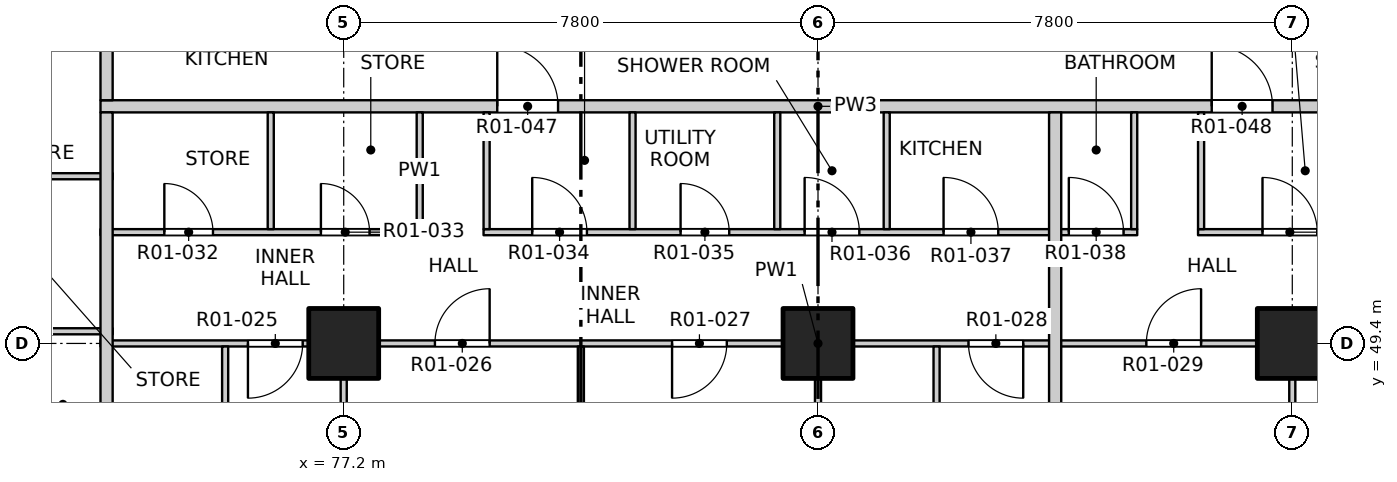
"""IFC4 building model, lengths in metres.
Left out: names, types, materials, properties, quantities, classifications, styles, units other than length and angle.
Written with IfcOpenShell. Run it as: python <this file> out.ifc"""

import sys

from ifc_helpers import new_model, si_unit, direction, frame, frame_2d, origin, origin_2d, place, context, subcontext, project, spatial, rectangle, extrude, element, fill, save


model = new_model("IFC4")
c1 = context("Model", 3, precision=1e-05, world=origin(), true_north=direction((0.0, 1.0)))
c2 = subcontext(c1, "Body", "Model", "MODEL_VIEW")
j1 = project(units=[si_unit("LENGTHUNIT", "METRE"), si_unit("PLANEANGLEUNIT", "RADIAN")], contexts=[c1])
p1 = place(None, origin())
s1 = spatial("IfcSite", under=j1, at=p1, CompositionType="ELEMENT")
p2 = place(p1, origin())
s2 = spatial("IfcBuilding", under=s1, at=p2, CompositionType="ELEMENT")
p3 = place(p2, frame((0.0, 0.0, 19.5)))
s3 = spatial("IfcBuildingStorey", under=s2, at=p3, CompositionType="ELEMENT", Elevation=19.5)
for number, where, z_axis, x_axis in (
    (1, (77.2, 49.4, -0.25), (0.0, 0.0, 1.0), (1.0, 0.0, 0.0)),
    (2, (85.0, 49.4, -0.25), (0.0, 0.0, 1.0), (1.0, 0.0, 0.0)),
    (3, (92.8, 49.4, -0.25), (0.0, 0.0, 1.0), (1.0, 0.0, 0.0)),
):
    element("IfcColumn", number, at=place(p3, frame(where, z_axis=z_axis, x_axis=x_axis)), inside=s3, PredefinedType="COLUMN", context=c2, shape_type="SweptSolid", body=[
        extrude(rectangle(XDim=1.15, YDim=1.15, at=origin_2d()), origin(), (0.0, 0.0, 1.0), 3.4),
    ])
p4 = place(p3, frame((73.2, 49.4, 0.0), z_axis=(0.0, 0.0, 1.0), x_axis=(1.0, 0.0, 0.0)))
e4 = element("IfcWall", 4, at=p4, inside=s3, PredefinedType="PARTITIONING", context=c2, shape_type="SweptSolid", body=[
    extrude(rectangle(XDim=23.6, YDim=0.1, at=frame_2d((11.8, 0.0))), origin(), (0.0, 0.0, 1.0), 3.15),
])
p5 = place(p4, frame((2.425, 0.0, 0.0)))
e5 = element("IfcOpeningElement", 5, at=p5, cuts=e4, PredefinedType="OPENING", context=c2, shape_type="SweptSolid", body=[
    extrude(rectangle(XDim=0.9, YDim=2.1, at=frame_2d((0.45, 1.05))), frame((0.0, 0.06, 0.0), z_axis=(0.0, -1.0, 0.0), x_axis=(1.0, 0.0, 0.0)), (0.0, 0.0, 1.0), 0.12),
])
p6 = place(p4, frame((5.5, 0.0, 0.0)))
e6 = element("IfcOpeningElement", 6, at=p6, cuts=e4, PredefinedType="OPENING", context=c2, shape_type="SweptSolid", body=[
    extrude(rectangle(XDim=0.9, YDim=2.1, at=frame_2d((0.45, 1.05))), frame((0.0, 0.06, 0.0), z_axis=(0.0, -1.0, 0.0), x_axis=(1.0, 0.0, 0.0)), (0.0, 0.0, 1.0), 0.12),
])
p7 = place(p4, frame((9.4, 0.0, 0.0)))
e7 = element("IfcOpeningElement", 7, at=p7, cuts=e4, PredefinedType="OPENING", context=c2, shape_type="SweptSolid", body=[
    extrude(rectangle(XDim=0.9, YDim=2.1, at=frame_2d((0.45, 1.05))), frame((0.0, 0.06, 0.0), z_axis=(0.0, -1.0, 0.0), x_axis=(1.0, 0.0, 0.0)), (0.0, 0.0, 1.0), 0.12),
])
p8 = place(p4, frame((14.275, 0.0, 0.0)))
e8 = element("IfcOpeningElement", 8, at=p8, cuts=e4, PredefinedType="OPENING", context=c2, shape_type="SweptSolid", body=[
    extrude(rectangle(XDim=0.9, YDim=2.1, at=frame_2d((0.45, 1.05))), frame((0.0, 0.06, 0.0), z_axis=(0.0, -1.0, 0.0), x_axis=(1.0, 0.0, 0.0)), (0.0, 0.0, 1.0), 0.12),
])
p9 = place(p4, frame((17.2, 0.0, 0.0)))
e9 = element("IfcOpeningElement", 9, at=p9, cuts=e4, PredefinedType="OPENING", context=c2, shape_type="SweptSolid", body=[
    extrude(rectangle(XDim=0.9, YDim=2.1, at=frame_2d((0.45, 1.05))), frame((0.0, 0.06, 0.0), z_axis=(0.0, -1.0, 0.0), x_axis=(1.0, 0.0, 0.0)), (0.0, 0.0, 1.0), 0.12),
])
p10 = place(p4, frame((22.075, 0.0, 0.0)))
e10 = element("IfcOpeningElement", 10, at=p10, cuts=e4, PredefinedType="OPENING", context=c2, shape_type="SweptSolid", body=[
    extrude(rectangle(XDim=0.9, YDim=2.1, at=frame_2d((0.45, 1.05))), frame((0.0, 0.06, 0.0), z_axis=(0.0, -1.0, 0.0), x_axis=(1.0, 0.0, 0.0)), (0.0, 0.0, 1.0), 0.12),
])
p11 = place(p3, frame((71.18, 49.6, 0.0), z_axis=(0.0, 0.0, 1.0), x_axis=(1.0, 0.0, 0.0)))
e11 = element("IfcWall", 11, at=p11, inside=s3, PredefinedType="PARTITIONING", context=c2, shape_type="SweptSolid", body=[
    extrude(rectangle(XDim=2.22, YDim=0.1, at=frame_2d((1.11, 0.0))), origin(), (0.0, 0.0, 1.0), 3.15),
])
p12 = place(p3, frame((73.2, 51.23, 0.0), z_axis=(0.0, 0.0, 1.0), x_axis=(1.0, 0.0, 0.0)))
e12 = element("IfcWall", 12, at=p12, inside=s3, PredefinedType="PARTITIONING", context=c2, shape_type="SweptSolid", body=[
    extrude(rectangle(XDim=5.3, YDim=0.1, at=frame_2d((2.65, 0.0))), origin(), (0.0, 0.0, 1.0), 3.15),
])
p13 = place(p12, frame((1.05, 0.0, 0.0)))
e13 = element("IfcOpeningElement", 13, at=p13, cuts=e12, PredefinedType="OPENING", context=c2, shape_type="SweptSolid", body=[
    extrude(rectangle(XDim=0.8, YDim=2.1, at=frame_2d((0.4, 1.05))), frame((0.0, 0.06, 0.0), z_axis=(0.0, -1.0, 0.0), x_axis=(1.0, 0.0, 0.0)), (0.0, 0.0, 1.0), 0.12),
])
p14 = place(p12, frame((3.625, 0.0, 0.0)))
e14 = element("IfcOpeningElement", 14, at=p14, cuts=e12, PredefinedType="OPENING", context=c2, shape_type="SweptSolid", body=[
    extrude(rectangle(XDim=0.8, YDim=2.1, at=frame_2d((0.4, 1.05))), frame((0.0, 0.06, 0.0), z_axis=(0.0, -1.0, 0.0), x_axis=(1.0, 0.0, 0.0)), (0.0, 0.0, 1.0), 0.12),
])
p15 = place(p3, frame((79.5, 51.23, 0.0), z_axis=(0.0, 0.0, 1.0), x_axis=(1.0, 0.0, 0.0)))
e15 = element("IfcWall", 15, at=p15, inside=s3, PredefinedType="PARTITIONING", context=c2, shape_type="SweptSolid", body=[
    extrude(rectangle(XDim=10.75, YDim=0.1, at=frame_2d((5.375, 0.0))), origin(), (0.0, 0.0, 1.0), 3.15),
])
p16 = place(p15, frame((0.8, 0.0, 0.0)))
e16 = element("IfcOpeningElement", 16, at=p16, cuts=e15, PredefinedType="OPENING", context=c2, shape_type="SweptSolid", body=[
    extrude(rectangle(XDim=0.9, YDim=2.1, at=frame_2d((0.45, 1.05))), frame((0.0, 0.06, 0.0), z_axis=(0.0, -1.0, 0.0), x_axis=(1.0, 0.0, 0.0)), (0.0, 0.0, 1.0), 0.12),
])
p17 = place(p15, frame((3.24, 0.0, 0.0)))
e17 = element("IfcOpeningElement", 17, at=p17, cuts=e15, PredefinedType="OPENING", context=c2, shape_type="SweptSolid", body=[
    extrude(rectangle(XDim=0.8, YDim=2.1, at=frame_2d((0.4, 1.05))), frame((0.0, 0.06, 0.0), z_axis=(0.0, -1.0, 0.0), x_axis=(1.0, 0.0, 0.0)), (0.0, 0.0, 1.0), 0.12),
])
p18 = place(p15, frame((5.28, 0.0, 0.0)))
e18 = element("IfcOpeningElement", 18, at=p18, cuts=e15, PredefinedType="OPENING", context=c2, shape_type="SweptSolid", body=[
    extrude(rectangle(XDim=0.9, YDim=2.1, at=frame_2d((0.45, 1.05))), frame((0.0, 0.06, 0.0), z_axis=(0.0, -1.0, 0.0), x_axis=(1.0, 0.0, 0.0)), (0.0, 0.0, 1.0), 0.12),
])
p19 = place(p15, frame((7.565, 0.0, 0.0)))
e19 = element("IfcOpeningElement", 19, at=p19, cuts=e15, PredefinedType="OPENING", context=c2, shape_type="SweptSolid", body=[
    extrude(rectangle(XDim=0.9, YDim=2.1, at=frame_2d((0.45, 1.05))), frame((0.0, 0.06, 0.0), z_axis=(0.0, -1.0, 0.0), x_axis=(1.0, 0.0, 0.0)), (0.0, 0.0, 1.0), 0.12),
])
p20 = place(p15, frame((9.625, 0.0, 0.0)))
e20 = element("IfcOpeningElement", 20, at=p20, cuts=e15, PredefinedType="OPENING", context=c2, shape_type="SweptSolid", body=[
    extrude(rectangle(XDim=0.9, YDim=2.1, at=frame_2d((0.45, 1.05))), frame((0.0, 0.06, 0.0), z_axis=(0.0, -1.0, 0.0), x_axis=(1.0, 0.0, 0.0)), (0.0, 0.0, 1.0), 0.12),
])
p21 = place(p3, frame((91.25, 51.23, 0.0), z_axis=(0.0, 0.0, 1.0), x_axis=(1.0, 0.0, 0.0)))
e21 = element("IfcWall", 21, at=p21, inside=s3, PredefinedType="PARTITIONING", context=c2, shape_type="SweptSolid", body=[
    extrude(rectangle(XDim=5.55, YDim=0.1, at=frame_2d((2.775, 0.0))), origin(), (0.0, 0.0, 1.0), 3.15),
])
p22 = place(p21, frame((1.06, 0.0, 0.0)))
e22 = element("IfcOpeningElement", 22, at=p22, cuts=e21, PredefinedType="OPENING", context=c2, shape_type="SweptSolid", body=[
    extrude(rectangle(XDim=0.9, YDim=2.1, at=frame_2d((0.45, 1.05))), frame((0.0, 0.06, 0.0), z_axis=(0.0, -1.0, 0.0), x_axis=(1.0, 0.0, 0.0)), (0.0, 0.0, 1.0), 0.12),
])
p23 = place(p21, frame((3.81, 0.0, 0.0)))
e23 = element("IfcOpeningElement", 23, at=p23, cuts=e21, PredefinedType="OPENING", context=c2, shape_type="SweptSolid", body=[
    extrude(rectangle(XDim=0.8, YDim=2.1, at=frame_2d((0.4, 1.05))), frame((0.0, 0.06, 0.0), z_axis=(0.0, -1.0, 0.0), x_axis=(1.0, 0.0, 0.0)), (0.0, 0.0, 1.0), 0.12),
])
p24 = place(p3, frame((71.18, 52.15, 0.0), z_axis=(0.0, 0.0, 1.0), x_axis=(1.0, 0.0, 0.0)))
e24 = element("IfcWall", 24, at=p24, inside=s3, PredefinedType="PARTITIONING", context=c2, shape_type="SweptSolid", body=[
    extrude(rectangle(XDim=2.22, YDim=0.1, at=frame_2d((1.11, 0.0))), origin(), (0.0, 0.0, 1.0), 3.15),
])
p25 = place(p3, frame((73.2, 53.3, 0.0), z_axis=(0.0, 0.0, 1.0), x_axis=(1.0, 0.0, 0.0)))
e25 = element("IfcWall", 25, at=p25, inside=s3, PredefinedType="PARTITIONING", context=c2, shape_type="SweptSolid", body=[
    extrude(rectangle(XDim=23.6, YDim=0.2, at=frame_2d((11.8, 0.0))), origin(), (0.0, 0.0, 1.0), 3.15),
])
p26 = place(p25, frame((6.525, 0.0, 0.0)))
e26 = element("IfcOpeningElement", 26, at=p26, cuts=e25, PredefinedType="OPENING", context=c2, shape_type="SweptSolid", body=[
    extrude(rectangle(XDim=1.0, YDim=2.1, at=frame_2d((0.5, 1.05))), frame((0.0, 0.11, 0.0), z_axis=(0.0, -1.0, 0.0), x_axis=(1.0, 0.0, 0.0)), (0.0, 0.0, 1.0), 0.22),
])
p27 = place(p25, frame((18.275, 0.0, 0.0)))
e27 = element("IfcOpeningElement", 27, at=p27, cuts=e25, PredefinedType="OPENING", context=c2, shape_type="SweptSolid", body=[
    extrude(rectangle(XDim=1.0, YDim=2.1, at=frame_2d((0.5, 1.05))), frame((0.0, 0.11, 0.0), z_axis=(0.0, -1.0, 0.0), x_axis=(1.0, 0.0, 0.0)), (0.0, 0.0, 1.0), 0.22),
])
p28 = place(p3, frame((73.3, 41.9, 0.0), z_axis=(0.0, 0.0, 1.0), x_axis=(0.0, 1.0, 0.0)))
e28 = element("IfcWall", 28, at=p28, inside=s3, PredefinedType="PARTITIONING", context=c2, shape_type="SweptSolid", body=[
    extrude(rectangle(XDim=11.3, YDim=0.2, at=frame_2d((5.65, 0.0))), origin(), (0.0, 0.0, 1.0), 3.15),
])
p29 = place(p3, frame((73.3, 53.4, 0.0), z_axis=(0.0, 0.0, 1.0), x_axis=(0.0, 1.0, 0.0)))
e29 = element("IfcWall", 29, at=p29, inside=s3, PredefinedType="PARTITIONING", context=c2, shape_type="SweptSolid", body=[
    extrude(rectangle(XDim=31.0, YDim=0.2, at=frame_2d((15.5, 0.0))), origin(), (0.0, 0.0, 1.0), 3.15),
])
p30 = place(p29, frame((2.325, 0.0, 0.0)))
e30 = element("IfcOpeningElement", 30, at=p30, cuts=e29, PredefinedType="OPENING", context=c2, shape_type="SweptSolid", body=[
    extrude(rectangle(XDim=1.0, YDim=2.1, at=frame_2d((0.5, 1.05))), frame((0.0, 0.11, 0.0), z_axis=(0.0, -1.0, 0.0), x_axis=(1.0, 0.0, 0.0)), (0.0, 0.0, 1.0), 0.22),
])
p31 = place(p29, frame((10.725, 0.0, 0.0)))
e31 = element("IfcOpeningElement", 31, at=p31, cuts=e29, PredefinedType="OPENING", context=c2, shape_type="SweptSolid", body=[
    extrude(rectangle(XDim=1.0, YDim=2.1, at=frame_2d((0.5, 1.05))), frame((0.0, 0.11, 0.0), z_axis=(0.0, -1.0, 0.0), x_axis=(1.0, 0.0, 0.0)), (0.0, 0.0, 1.0), 0.22),
])
p32 = place(p29, frame((18.225, 0.0, 0.0)))
e32 = element("IfcOpeningElement", 32, at=p32, cuts=e29, PredefinedType="OPENING", context=c2, shape_type="SweptSolid", body=[
    extrude(rectangle(XDim=1.0, YDim=2.1, at=frame_2d((0.5, 1.05))), frame((0.0, 0.11, 0.0), z_axis=(0.0, -1.0, 0.0), x_axis=(1.0, 0.0, 0.0)), (0.0, 0.0, 1.0), 0.22),
])
p33 = place(p29, frame((25.925, 0.0, 0.0)))
e33 = element("IfcOpeningElement", 33, at=p33, cuts=e29, PredefinedType="OPENING", context=c2, shape_type="SweptSolid", body=[
    extrude(rectangle(XDim=1.0, YDim=2.1, at=frame_2d((0.5, 1.05))), frame((0.0, 0.11, 0.0), z_axis=(0.0, -1.0, 0.0), x_axis=(1.0, 0.0, 0.0)), (0.0, 0.0, 1.0), 0.22),
])
p34 = place(p3, frame((75.25, 46.0, 0.0), z_axis=(0.0, 0.0, 1.0), x_axis=(0.0, 1.0, 0.0)))
e34 = element("IfcWall", 34, at=p34, inside=s3, PredefinedType="PARTITIONING", context=c2, shape_type="SweptSolid", body=[
    extrude(rectangle(XDim=3.35, YDim=0.1, at=frame_2d((1.675, 0.0))), origin(), (0.0, 0.0, 1.0), 3.15),
])
p35 = place(p3, frame((76.0, 51.28, 0.0), z_axis=(0.0, 0.0, 1.0), x_axis=(0.0, 1.0, 0.0)))
e35 = element("IfcWall", 35, at=p35, inside=s3, PredefinedType="PARTITIONING", context=c2, shape_type="SweptSolid", body=[
    extrude(rectangle(XDim=1.92, YDim=0.1, at=frame_2d((0.96, 0.0))), origin(), (0.0, 0.0, 1.0), 3.15),
])
p36 = place(p3, frame((77.2, 41.9, 0.0), z_axis=(0.0, 0.0, 1.0), x_axis=(0.0, 1.0, 0.0)))
e36 = element("IfcWall", 36, at=p36, inside=s3, PredefinedType="PARTITIONING", context=c2, shape_type="SweptSolid", body=[
    extrude(rectangle(XDim=7.45, YDim=0.1, at=frame_2d((3.725, 0.0))), origin(), (0.0, 0.0, 1.0), 2.55),
])
for number, where, z_axis, x_axis in (
    (37, (78.45, 51.28, 0.0), (0.0, 0.0, 1.0), (0.0, 1.0, 0.0)),
    (38, (79.55, 51.28, 0.0), (0.0, 0.0, 1.0), (0.0, 1.0, 0.0)),
):
    element("IfcWall", number, at=place(p3, frame(where, z_axis=z_axis, x_axis=x_axis)), inside=s3, PredefinedType="PARTITIONING", context=c2, shape_type="SweptSolid", body=[
        extrude(rectangle(XDim=1.92, YDim=0.1, at=frame_2d((0.96, 0.0))), origin(), (0.0, 0.0, 1.0), 3.15),
    ])
p37 = place(p3, frame((81.1, 41.9, 0.0), z_axis=(0.0, 0.0, 1.0), x_axis=(0.0, 1.0, 0.0)))
e39 = element("IfcWall", 39, at=p37, inside=s3, PredefinedType="PARTITIONING", context=c2, shape_type="SweptSolid", body=[
    extrude(rectangle(XDim=7.45, YDim=0.1, at=frame_2d((3.725, 0.0))), origin(), (0.0, 0.0, 1.0), 3.15),
])
for number, where, z_axis, x_axis in (
    (40, (81.95, 51.28, 0.0), (0.0, 0.0, 1.0), (0.0, 1.0, 0.0)),
    (41, (84.33, 51.28, 0.0), (0.0, 0.0, 1.0), (0.0, 1.0, 0.0)),
):
    element("IfcWall", number, at=place(p3, frame(where, z_axis=z_axis, x_axis=x_axis)), inside=s3, PredefinedType="PARTITIONING", context=c2, shape_type="SweptSolid", body=[
        extrude(rectangle(XDim=1.92, YDim=0.1, at=frame_2d((0.96, 0.0))), origin(), (0.0, 0.0, 1.0), 3.15),
    ])
p38 = place(p3, frame((85.0, 41.9, 0.0), z_axis=(0.0, 0.0, 1.0), x_axis=(0.0, 1.0, 0.0)))
e42 = element("IfcWall", 42, at=p38, inside=s3, PredefinedType="PARTITIONING", context=c2, shape_type="SweptSolid", body=[
    extrude(rectangle(XDim=7.45, YDim=0.1, at=frame_2d((3.725, 0.0))), origin(), (0.0, 0.0, 1.0), 2.55),
])
p39 = place(p3, frame((86.13, 51.28, 0.0), z_axis=(0.0, 0.0, 1.0), x_axis=(0.0, 1.0, 0.0)))
e43 = element("IfcWall", 43, at=p39, inside=s3, PredefinedType="PARTITIONING", context=c2, shape_type="SweptSolid", body=[
    extrude(rectangle(XDim=1.92, YDim=0.1, at=frame_2d((0.96, 0.0))), origin(), (0.0, 0.0, 1.0), 3.15),
])
p40 = place(p3, frame((86.95, 46.0, 0.0), z_axis=(0.0, 0.0, 1.0), x_axis=(0.0, 1.0, 0.0)))
e44 = element("IfcWall", 44, at=p40, inside=s3, PredefinedType="PARTITIONING", context=c2, shape_type="SweptSolid", body=[
    extrude(rectangle(XDim=3.35, YDim=0.1, at=frame_2d((1.675, 0.0))), origin(), (0.0, 0.0, 1.0), 3.15),
])
p41 = place(p3, frame((88.9, 41.9, 0.0), z_axis=(0.0, 0.0, 1.0), x_axis=(0.0, 1.0, 0.0)))
e45 = element("IfcWall", 45, at=p41, inside=s3, PredefinedType="PARTITIONING", context=c2, shape_type="SweptSolid", body=[
    extrude(rectangle(XDim=11.3, YDim=0.2, at=frame_2d((5.65, 0.0))), origin(), (0.0, 0.0, 1.0), 3.15),
])
for number, where, z_axis, x_axis in (
    (46, (90.2, 51.28, 0.0), (0.0, 0.0, 1.0), (0.0, 1.0, 0.0)),
    (47, (91.3, 51.28, 0.0), (0.0, 0.0, 1.0), (0.0, 1.0, 0.0)),
):
    element("IfcWall", number, at=place(p3, frame(where, z_axis=z_axis, x_axis=x_axis)), inside=s3, PredefinedType="PARTITIONING", context=c2, shape_type="SweptSolid", body=[
        extrude(rectangle(XDim=1.92, YDim=0.1, at=frame_2d((0.96, 0.0))), origin(), (0.0, 0.0, 1.0), 3.15),
    ])
p42 = place(p3, frame((92.8, 41.9, 0.0), z_axis=(0.0, 0.0, 1.0), x_axis=(0.0, 1.0, 0.0)))
e48 = element("IfcWall", 48, at=p42, inside=s3, PredefinedType="PARTITIONING", context=c2, shape_type="SweptSolid", body=[
    extrude(rectangle(XDim=7.45, YDim=0.1, at=frame_2d((3.725, 0.0))), origin(), (0.0, 0.0, 1.0), 2.55),
])
p43 = place(p5, origin())
e49 = element("IfcDoor", 49, at=p43, inside=s3, OperationType="SINGLE_SWING_RIGHT", PredefinedType="DOOR", context=c2, shape_type="SweptSolid", body=[
    extrude(rectangle(XDim=0.9, YDim=2.1, at=frame_2d((0.45, 1.05))), frame((0.0, 0.025, 0.0), z_axis=(0.0, -1.0, 0.0), x_axis=(1.0, 0.0, 0.0)), (0.0, 0.0, 1.0), 0.05),
])
fill(e5, e49)
p44 = place(p6, origin())
e50 = element("IfcDoor", 50, at=p44, inside=s3, OperationType="SINGLE_SWING_RIGHT", PredefinedType="DOOR", context=c2, shape_type="SweptSolid", body=[
    extrude(rectangle(XDim=0.9, YDim=2.1, at=frame_2d((0.45, 1.05))), frame((0.0, 0.025, 0.0), z_axis=(0.0, -1.0, 0.0), x_axis=(1.0, 0.0, 0.0)), (0.0, 0.0, 1.0), 0.05),
])
fill(e6, e50)
p45 = place(p7, origin())
e51 = element("IfcDoor", 51, at=p45, inside=s3, OperationType="SINGLE_SWING_RIGHT", PredefinedType="DOOR", context=c2, shape_type="SweptSolid", body=[
    extrude(rectangle(XDim=0.9, YDim=2.1, at=frame_2d((0.45, 1.05))), frame((0.0, 0.025, 0.0), z_axis=(0.0, -1.0, 0.0), x_axis=(1.0, 0.0, 0.0)), (0.0, 0.0, 1.0), 0.05),
])
fill(e7, e51)
p46 = place(p8, origin())
e52 = element("IfcDoor", 52, at=p46, inside=s3, OperationType="SINGLE_SWING_LEFT", PredefinedType="DOOR", context=c2, shape_type="SweptSolid", body=[
    extrude(rectangle(XDim=0.9, YDim=2.1, at=frame_2d((0.45, 1.05))), frame((0.0, 0.025, 0.0), z_axis=(0.0, -1.0, 0.0), x_axis=(1.0, 0.0, 0.0)), (0.0, 0.0, 1.0), 0.05),
])
fill(e8, e52)
p47 = place(p9, origin())
e53 = element("IfcDoor", 53, at=p47, inside=s3, OperationType="SINGLE_SWING_RIGHT", PredefinedType="DOOR", context=c2, shape_type="SweptSolid", body=[
    extrude(rectangle(XDim=0.9, YDim=2.1, at=frame_2d((0.45, 1.05))), frame((0.0, 0.025, 0.0), z_axis=(0.0, -1.0, 0.0), x_axis=(1.0, 0.0, 0.0)), (0.0, 0.0, 1.0), 0.05),
])
fill(e9, e53)
p48 = place(p13, origin())
e54 = element("IfcDoor", 54, at=p48, inside=s3, OperationType="SINGLE_SWING_LEFT", PredefinedType="DOOR", context=c2, shape_type="SweptSolid", body=[
    extrude(rectangle(XDim=0.8, YDim=2.1, at=frame_2d((0.4, 1.05))), frame((0.0, 0.025, 0.0), z_axis=(0.0, -1.0, 0.0), x_axis=(1.0, 0.0, 0.0)), (0.0, 0.0, 1.0), 0.05),
])
fill(e13, e54)
p49 = place(p14, origin())
e55 = element("IfcDoor", 55, at=p49, inside=s3, OperationType="SINGLE_SWING_LEFT", PredefinedType="DOOR", context=c2, shape_type="SweptSolid", body=[
    extrude(rectangle(XDim=0.8, YDim=2.1, at=frame_2d((0.4, 1.05))), frame((0.0, 0.025, 0.0), z_axis=(0.0, -1.0, 0.0), x_axis=(1.0, 0.0, 0.0)), (0.0, 0.0, 1.0), 0.05),
])
fill(e14, e55)
p50 = place(p16, origin())
e56 = element("IfcDoor", 56, at=p50, inside=s3, OperationType="SINGLE_SWING_LEFT", PredefinedType="DOOR", context=c2, shape_type="SweptSolid", body=[
    extrude(rectangle(XDim=0.9, YDim=2.1, at=frame_2d((0.45, 1.05))), frame((0.0, 0.025, 0.0), z_axis=(0.0, -1.0, 0.0), x_axis=(1.0, 0.0, 0.0)), (0.0, 0.0, 1.0), 0.05),
])
fill(e16, e56)
p51 = place(p17, origin())
e57 = element("IfcDoor", 57, at=p51, inside=s3, OperationType="SINGLE_SWING_LEFT", PredefinedType="DOOR", context=c2, shape_type="SweptSolid", body=[
    extrude(rectangle(XDim=0.8, YDim=2.1, at=frame_2d((0.4, 1.05))), frame((0.0, 0.025, 0.0), z_axis=(0.0, -1.0, 0.0), x_axis=(1.0, 0.0, 0.0)), (0.0, 0.0, 1.0), 0.05),
])
fill(e17, e57)
p52 = place(p18, origin())
e58 = element("IfcDoor", 58, at=p52, inside=s3, OperationType="SINGLE_SWING_LEFT", PredefinedType="DOOR", context=c2, shape_type="SweptSolid", body=[
    extrude(rectangle(XDim=0.9, YDim=2.1, at=frame_2d((0.45, 1.05))), frame((0.0, 0.025, 0.0), z_axis=(0.0, -1.0, 0.0), x_axis=(1.0, 0.0, 0.0)), (0.0, 0.0, 1.0), 0.05),
])
fill(e18, e58)
p53 = place(p19, origin())
e59 = element("IfcDoor", 59, at=p53, inside=s3, OperationType="SINGLE_SWING_LEFT", PredefinedType="DOOR", context=c2, shape_type="SweptSolid", body=[
    extrude(rectangle(XDim=0.9, YDim=2.1, at=frame_2d((0.45, 1.05))), frame((0.0, 0.025, 0.0), z_axis=(0.0, -1.0, 0.0), x_axis=(1.0, 0.0, 0.0)), (0.0, 0.0, 1.0), 0.05),
])
fill(e19, e59)
p54 = place(p20, origin())
e60 = element("IfcDoor", 60, at=p54, inside=s3, OperationType="SINGLE_SWING_LEFT", PredefinedType="DOOR", context=c2, shape_type="SweptSolid", body=[
    extrude(rectangle(XDim=0.9, YDim=2.1, at=frame_2d((0.45, 1.05))), frame((0.0, 0.025, 0.0), z_axis=(0.0, -1.0, 0.0), x_axis=(1.0, 0.0, 0.0)), (0.0, 0.0, 1.0), 0.05),
])
fill(e20, e60)
p55 = place(p22, origin())
e61 = element("IfcDoor", 61, at=p55, inside=s3, OperationType="SINGLE_SWING_LEFT", PredefinedType="DOOR", context=c2, shape_type="SweptSolid", body=[
    extrude(rectangle(XDim=0.9, YDim=2.1, at=frame_2d((0.45, 1.05))), frame((0.0, 0.025, 0.0), z_axis=(0.0, -1.0, 0.0), x_axis=(1.0, 0.0, 0.0)), (0.0, 0.0, 1.0), 0.05),
])
fill(e22, e61)
p56 = place(p26, origin())
e62 = element("IfcDoor", 62, at=p56, inside=s3, OperationType="SINGLE_SWING_LEFT", PredefinedType="DOOR", context=c2, shape_type="SweptSolid", body=[
    extrude(rectangle(XDim=1.0, YDim=2.1, at=frame_2d((0.5, 1.05))), frame((0.0, 0.025, 0.0), z_axis=(0.0, -1.0, 0.0), x_axis=(1.0, 0.0, 0.0)), (0.0, 0.0, 1.0), 0.05),
])
fill(e26, e62)
p57 = place(p27, origin())
e63 = element("IfcDoor", 63, at=p57, inside=s3, OperationType="SINGLE_SWING_LEFT", PredefinedType="DOOR", context=c2, shape_type="SweptSolid", body=[
    extrude(rectangle(XDim=1.0, YDim=2.1, at=frame_2d((0.5, 1.05))), frame((0.0, 0.025, 0.0), z_axis=(0.0, -1.0, 0.0), x_axis=(1.0, 0.0, 0.0)), (0.0, 0.0, 1.0), 0.05),
])
fill(e27, e63)
save(model, sys.argv[1])
